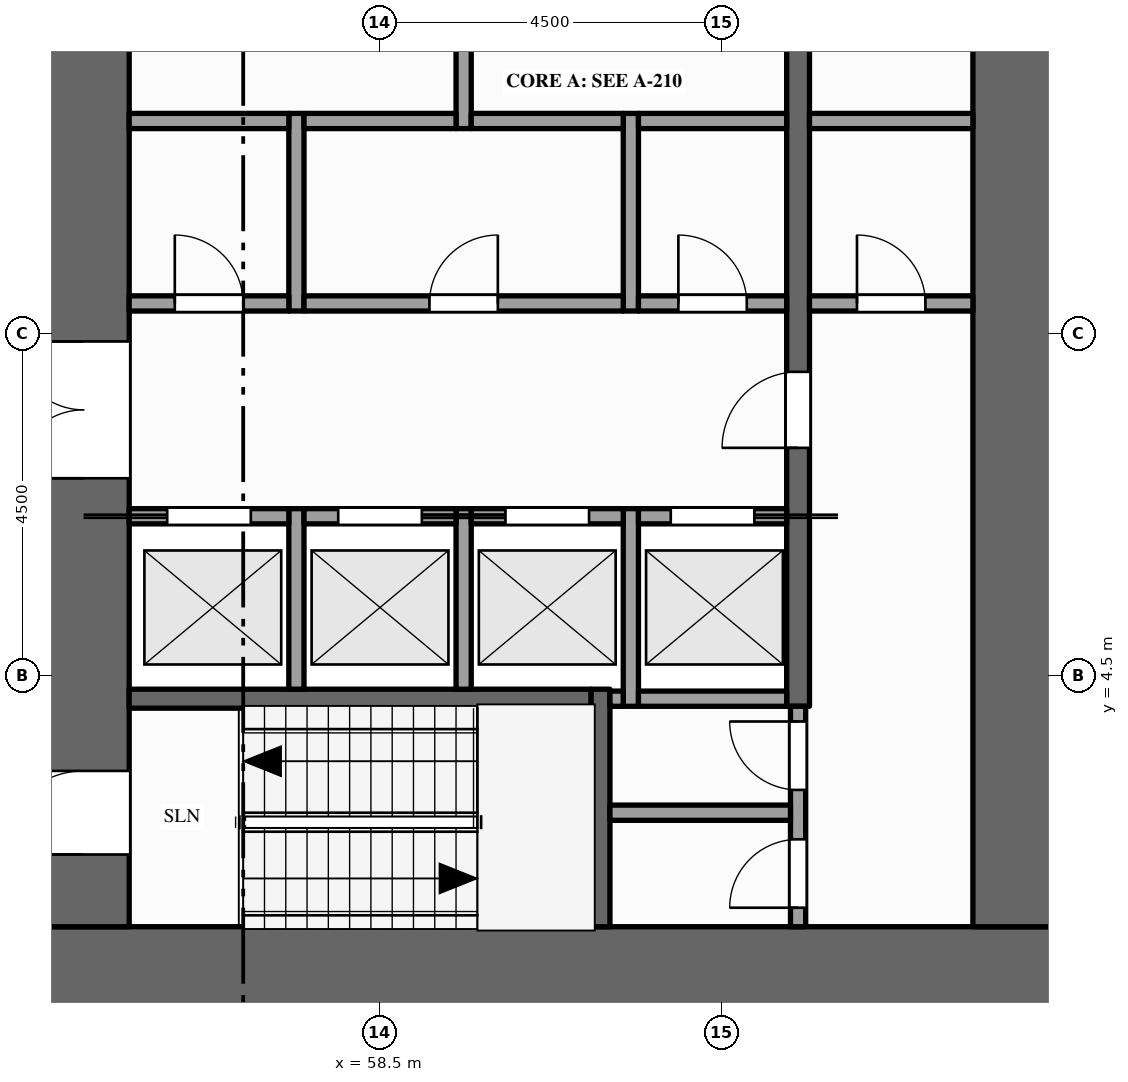
"""IFC4 building model, lengths in metres.
Left out: names, types, materials, properties, quantities, classifications, styles, units other than length and angle.
Written with IfcOpenShell. Run it as: python <this file> out.ifc"""

import sys

from ifc_helpers import new_model, si_unit, direction, frame, frame_2d, origin, place, context, subcontext, project, spatial, rectangle, extrude, element, fill, save


model = new_model("IFC4")
c1 = context("Model", 3, precision=1e-05, world=origin(), true_north=direction((0.0, 1.0)))
c2 = subcontext(c1, "Body", "Model", "MODEL_VIEW")
j1 = project(units=[si_unit("LENGTHUNIT", "METRE"), si_unit("PLANEANGLEUNIT", "RADIAN")], contexts=[c1])
p1 = place(None, origin())
s1 = spatial("IfcSite", under=j1, at=p1, CompositionType="ELEMENT")
p2 = place(p1, origin())
s2 = spatial("IfcBuilding", under=s1, at=p2, CompositionType="ELEMENT")
p3 = place(p2, frame((0.0, 0.0, 49.0)))
s3 = spatial("IfcBuildingStorey", under=s2, at=p3, CompositionType="ELEMENT", Elevation=49.0)
p4 = place(p3, frame((67.5, 0.6, -0.15), z_axis=(0.0, 0.0, 1.0), x_axis=(-1.0, 0.0, 0.0)))
e1 = element("IfcWall", 1, at=p4, inside=s3, PredefinedType="SHEAR", context=c2, shape_type="SweptSolid", body=[
    extrude(rectangle(XDim=13.5, YDim=1.2, at=frame_2d((6.75, 0.0))), origin(), (0.0, 0.0, 1.0), 4.0),
])
p5 = place(p3, frame((54.6, 1.2, -0.15), z_axis=(0.0, 0.0, 1.0), x_axis=(0.0, 1.0, 0.0)))
e2 = element("IfcWall", 2, at=p5, inside=s3, PredefinedType="SHEAR", context=c2, shape_type="SweptSolid", body=[
    extrude(rectangle(XDim=20.1, YDim=1.2, at=frame_2d((10.05, 0.0))), origin(), (0.0, 0.0, 1.0), 4.0),
])
p6 = place(p5, frame((5.9, 0.0, 0.15)))
e3 = element("IfcOpeningElement", 3, at=p6, cuts=e2, PredefinedType="OPENING", context=c2, shape_type="SweptSolid", body=[
    extrude(rectangle(XDim=1.8, YDim=2.1, at=frame_2d((0.9, 1.05))), frame((0.0, 0.61, 0.0), z_axis=(0.0, -1.0, 0.0), x_axis=(1.0, 0.0, 0.0)), (0.0, 0.0, 1.0), 1.22),
])
p7 = place(p5, frame((11.95, 0.0, 0.15)))
e4 = element("IfcOpeningElement", 4, at=p7, cuts=e2, PredefinedType="OPENING", context=c2, shape_type="SweptSolid", body=[
    extrude(rectangle(XDim=1.1, YDim=2.1, at=frame_2d((0.55, 1.05))), frame((0.0, 0.61, 0.0), z_axis=(0.0, -1.0, 0.0), x_axis=(1.0, 0.0, 0.0)), (0.0, 0.0, 1.0), 1.22),
])
p8 = place(p5, frame((0.95, 0.0, 0.15)))
e5 = element("IfcOpeningElement", 5, at=p8, cuts=e2, PredefinedType="OPENING", context=c2, shape_type="SweptSolid", body=[
    extrude(rectangle(XDim=1.1, YDim=2.1, at=frame_2d((0.55, 1.05))), frame((0.0, 0.61, 0.0), z_axis=(0.0, -1.0, 0.0), x_axis=(1.0, 0.0, 0.0)), (0.0, 0.0, 1.0), 1.22),
])
p9 = place(p5, frame((18.15, 0.0, 0.15)))
e6 = element("IfcOpeningElement", 6, at=p9, cuts=e2, PredefinedType="OPENING", context=c2, shape_type="SweptSolid", body=[
    extrude(rectangle(XDim=1.1, YDim=2.1, at=frame_2d((0.55, 1.05))), frame((0.0, 0.61, 0.0), z_axis=(0.0, -1.0, 0.0), x_axis=(1.0, 0.0, 0.0)), (0.0, 0.0, 1.0), 1.22),
])
p10 = place(p3, frame((66.9, 1.2, -0.15), z_axis=(0.0, 0.0, 1.0), x_axis=(0.0, 1.0, 0.0)))
e7 = element("IfcWall", 7, at=p10, inside=s3, PredefinedType="SHEAR", context=c2, shape_type="SweptSolid", body=[
    extrude(rectangle(XDim=20.1, YDim=1.2, at=frame_2d((10.05, 0.0))), origin(), (0.0, 0.0, 1.0), 4.0),
])
p11 = place(p3, frame((57.4, 4.325, 0.0), z_axis=(0.0, 0.0, 1.0), x_axis=(0.0, 1.0, 0.0)))
e8 = element("IfcWall", 8, at=p11, inside=s3, PredefinedType="SOLIDWALL", context=c2, shape_type="SweptSolid", body=[
    extrude(rectangle(XDim=2.375, YDim=0.2, at=frame_2d((1.188, 0.0))), origin(), (0.0, 0.0, 1.0), 3.85),
])
p12 = place(p3, frame((57.4, 9.3, 0.0), z_axis=(0.0, 0.0, 1.0), x_axis=(0.0, 1.0, 0.0)))
e9 = element("IfcWall", 9, at=p12, inside=s3, PredefinedType="PARTITIONING", context=c2, shape_type="SweptSolid", body=[
    extrude(rectangle(XDim=2.6, YDim=0.2, at=frame_2d((1.3, 0.0))), origin(), (0.0, 0.0, 1.0), 3.85),
])
p13 = place(p3, frame((59.6, 4.325, 0.0), z_axis=(0.0, 0.0, 1.0), x_axis=(0.0, 1.0, 0.0)))
e10 = element("IfcWall", 10, at=p13, inside=s3, PredefinedType="SOLIDWALL", context=c2, shape_type="SweptSolid", body=[
    extrude(rectangle(XDim=2.375, YDim=0.2, at=frame_2d((1.188, 0.0))), origin(), (0.0, 0.0, 1.0), 3.85),
])
p14 = place(p3, frame((59.6, 11.7, 0.0), z_axis=(0.0, 0.0, 1.0), x_axis=(0.0, 1.0, 0.0)))
e11 = element("IfcWall", 11, at=p14, inside=s3, PredefinedType="PARTITIONING", context=c2, shape_type="SweptSolid", body=[
    extrude(rectangle(XDim=3.8, YDim=0.2, at=frame_2d((1.9, 0.0))), origin(), (0.0, 0.0, 1.0), 3.85),
])
p15 = place(p14, frame((1.5, 0.0, 0.0)))
e12 = element("IfcOpeningElement", 12, at=p15, cuts=e11, PredefinedType="OPENING", context=c2, shape_type="SweptSolid", body=[
    extrude(rectangle(XDim=1.0, YDim=2.1, at=frame_2d((0.5, 1.05))), frame((0.0, 0.11, 0.0), z_axis=(0.0, -1.0, 0.0), x_axis=(1.0, 0.0, 0.0)), (0.0, 0.0, 1.0), 0.22),
])
p16 = place(p3, frame((61.4, 1.2, 0.0), z_axis=(0.0, 0.0, 1.0), x_axis=(0.0, 1.0, 0.0)))
e13 = element("IfcWall", 13, at=p16, inside=s3, PredefinedType="SHEAR", context=c2, shape_type="SweptSolid", body=[
    extrude(rectangle(XDim=3.125, YDim=0.25, at=frame_2d((1.562, 0.0))), origin(), (0.0, 0.0, 1.0), 3.85),
])
p17 = place(p3, frame((61.8, 4.1, 0.0), z_axis=(0.0, 0.0, 1.0), x_axis=(0.0, 1.0, 0.0)))
e14 = element("IfcWall", 14, at=p17, inside=s3, PredefinedType="SOLIDWALL", context=c2, shape_type="SweptSolid", body=[
    extrude(rectangle(XDim=2.6, YDim=0.2, at=frame_2d((1.3, 0.0))), origin(), (0.0, 0.0, 1.0), 3.85),
])
p18 = place(p3, frame((61.8, 9.3, 0.0), z_axis=(0.0, 0.0, 1.0), x_axis=(0.0, 1.0, 0.0)))
e15 = element("IfcWall", 15, at=p18, inside=s3, PredefinedType="PARTITIONING", context=c2, shape_type="SweptSolid", body=[
    extrude(rectangle(XDim=2.6, YDim=0.2, at=frame_2d((1.3, 0.0))), origin(), (0.0, 0.0, 1.0), 3.85),
])
p19 = place(p3, frame((64.0, 1.2, 0.0), z_axis=(0.0, 0.0, 1.0), x_axis=(0.0, 1.0, 0.0)))
e16 = element("IfcWall", 16, at=p19, inside=s3, PredefinedType="PARTITIONING", context=c2, shape_type="SweptSolid", body=[
    extrude(rectangle(XDim=2.9, YDim=0.2, at=frame_2d((1.45, 0.0))), origin(), (0.0, 0.0, 1.0), 3.85),
])
p20 = place(p19, frame((0.25, 0.0, 0.0)))
e17 = element("IfcOpeningElement", 17, at=p20, cuts=e16, PredefinedType="OPENING", context=c2, shape_type="SweptSolid", body=[
    extrude(rectangle(XDim=0.9, YDim=2.1, at=frame_2d((0.45, 1.05))), frame((0.0, 0.11, 0.0), z_axis=(0.0, -1.0, 0.0), x_axis=(1.0, 0.0, 0.0)), (0.0, 0.0, 1.0), 0.22),
])
p21 = place(p19, frame((1.8, 0.0, 0.0)))
e18 = element("IfcOpeningElement", 18, at=p21, cuts=e16, PredefinedType="OPENING", context=c2, shape_type="SweptSolid", body=[
    extrude(rectangle(XDim=0.9, YDim=2.1, at=frame_2d((0.45, 1.05))), frame((0.0, 0.11, 0.0), z_axis=(0.0, -1.0, 0.0), x_axis=(1.0, 0.0, 0.0)), (0.0, 0.0, 1.0), 0.22),
])
p22 = place(p3, frame((64.0, 4.1, 0.0), z_axis=(0.0, 0.0, 1.0), x_axis=(0.0, 1.0, 0.0)))
e19 = element("IfcWall", 19, at=p22, inside=s3, PredefinedType="SHEAR", context=c2, shape_type="SweptSolid", body=[
    extrude(rectangle(XDim=14.5, YDim=0.3, at=frame_2d((7.25, 0.0))), origin(), (0.0, 0.0, 1.0), 3.85),
])
p23 = place(p22, frame((3.4, 0.0, 0.0)))
e20 = element("IfcOpeningElement", 20, at=p23, cuts=e19, PredefinedType="OPENING", context=c2, shape_type="SweptSolid", body=[
    extrude(rectangle(XDim=1.0, YDim=2.1, at=frame_2d((0.5, 1.05))), frame((0.0, 0.16, 0.0), z_axis=(0.0, -1.0, 0.0), x_axis=(1.0, 0.0, 0.0)), (0.0, 0.0, 1.0), 0.32),
])
p24 = place(p22, frame((9.1, 0.0, 0.0)))
e21 = element("IfcOpeningElement", 21, at=p24, cuts=e19, PredefinedType="OPENING", context=c2, shape_type="SweptSolid", body=[
    extrude(rectangle(XDim=1.0, YDim=2.1, at=frame_2d((0.5, 1.05))), frame((0.0, 0.16, 0.0), z_axis=(0.0, -1.0, 0.0), x_axis=(1.0, 0.0, 0.0)), (0.0, 0.0, 1.0), 0.32),
])
p25 = place(p3, frame((61.525, 2.7, 0.0), z_axis=(0.0, 0.0, 1.0), x_axis=(1.0, 0.0, 0.0)))
e22 = element("IfcWall", 22, at=p25, inside=s3, PredefinedType="PARTITIONING", context=c2, shape_type="SweptSolid", body=[
    extrude(rectangle(XDim=2.375, YDim=0.2, at=frame_2d((1.188, 0.0))), origin(), (0.0, 0.0, 1.0), 3.85),
])
p26 = place(p3, frame((55.2, 4.2, 0.0), z_axis=(0.0, 0.0, 1.0), x_axis=(1.0, 0.0, 0.0)))
e23 = element("IfcWall", 23, at=p26, inside=s3, PredefinedType="SHEAR", context=c2, shape_type="SweptSolid", body=[
    extrude(rectangle(XDim=6.075, YDim=0.25, at=frame_2d((3.038, 0.0))), origin(), (0.0, 0.0, 1.0), 3.85),
])
p27 = place(p3, frame((61.525, 4.2, 0.0), z_axis=(0.0, 0.0, 1.0), x_axis=(1.0, 0.0, 0.0)))
e24 = element("IfcWall", 24, at=p27, inside=s3, PredefinedType="SOLIDWALL", context=c2, shape_type="SweptSolid", body=[
    extrude(rectangle(XDim=0.175, YDim=0.2, at=frame_2d((0.087, 0.0))), origin(), (0.0, 0.0, 1.0), 3.85),
])
p28 = place(p3, frame((61.9, 4.2, 0.0), z_axis=(0.0, 0.0, 1.0), x_axis=(1.0, 0.0, 0.0)))
e25 = element("IfcWall", 25, at=p28, inside=s3, PredefinedType="SOLIDWALL", context=c2, shape_type="SweptSolid", body=[
    extrude(rectangle(XDim=1.95, YDim=0.2, at=frame_2d((0.975, 0.0))), origin(), (0.0, 0.0, 1.0), 3.85),
])
p29 = place(p3, frame((55.2, 6.6, 0.0), z_axis=(0.0, 0.0, 1.0), x_axis=(1.0, 0.0, 0.0)))
e26 = element("IfcWall", 26, at=p29, inside=s3, PredefinedType="SOLIDWALL", context=c2, shape_type="SweptSolid", body=[
    extrude(rectangle(XDim=2.1, YDim=0.2, at=frame_2d((1.05, 0.0))), origin(), (0.0, 0.0, 1.0), 3.85),
])
p30 = place(p29, frame((0.5, 0.0, 0.012)))
e27 = element("IfcOpeningElement", 27, at=p30, cuts=e26, PredefinedType="OPENING", context=c2, shape_type="SweptSolid", body=[
    extrude(rectangle(XDim=1.1, YDim=2.1, at=frame_2d((0.55, 1.05))), frame((0.0, 0.11, 0.0), z_axis=(0.0, -1.0, 0.0), x_axis=(1.0, 0.0, 0.0)), (0.0, 0.0, 1.0), 0.22),
])
p31 = place(p3, frame((57.5, 6.6, 0.0), z_axis=(0.0, 0.0, 1.0), x_axis=(1.0, 0.0, 0.0)))
e28 = element("IfcWall", 28, at=p31, inside=s3, PredefinedType="SOLIDWALL", context=c2, shape_type="SweptSolid", body=[
    extrude(rectangle(XDim=2.0, YDim=0.2, at=frame_2d((1.0, 0.0))), origin(), (0.0, 0.0, 1.0), 3.85),
])
p32 = place(p31, frame((0.45, 0.0, 0.012)))
e29 = element("IfcOpeningElement", 29, at=p32, cuts=e28, PredefinedType="OPENING", context=c2, shape_type="SweptSolid", body=[
    extrude(rectangle(XDim=1.1, YDim=2.1, at=frame_2d((0.55, 1.05))), frame((0.0, 0.11, 0.0), z_axis=(0.0, -1.0, 0.0), x_axis=(1.0, 0.0, 0.0)), (0.0, 0.0, 1.0), 0.22),
])
p33 = place(p3, frame((59.7, 6.6, 0.0), z_axis=(0.0, 0.0, 1.0), x_axis=(1.0, 0.0, 0.0)))
e30 = element("IfcWall", 30, at=p33, inside=s3, PredefinedType="SOLIDWALL", context=c2, shape_type="SweptSolid", body=[
    extrude(rectangle(XDim=2.0, YDim=0.2, at=frame_2d((1.0, 0.0))), origin(), (0.0, 0.0, 1.0), 3.85),
])
p34 = place(p33, frame((0.45, 0.0, 0.012)))
e31 = element("IfcOpeningElement", 31, at=p34, cuts=e30, PredefinedType="OPENING", context=c2, shape_type="SweptSolid", body=[
    extrude(rectangle(XDim=1.1, YDim=2.1, at=frame_2d((0.55, 1.05))), frame((0.0, 0.11, 0.0), z_axis=(0.0, -1.0, 0.0), x_axis=(1.0, 0.0, 0.0)), (0.0, 0.0, 1.0), 0.22),
])
p35 = place(p3, frame((61.9, 6.6, 0.0), z_axis=(0.0, 0.0, 1.0), x_axis=(1.0, 0.0, 0.0)))
e32 = element("IfcWall", 32, at=p35, inside=s3, PredefinedType="SOLIDWALL", context=c2, shape_type="SweptSolid", body=[
    extrude(rectangle(XDim=1.95, YDim=0.2, at=frame_2d((0.975, 0.0))), origin(), (0.0, 0.0, 1.0), 3.85),
])
p36 = place(p35, frame((0.425, 0.0, 0.012)))
e33 = element("IfcOpeningElement", 33, at=p36, cuts=e32, PredefinedType="OPENING", context=c2, shape_type="SweptSolid", body=[
    extrude(rectangle(XDim=1.1, YDim=2.1, at=frame_2d((0.55, 1.05))), frame((0.0, 0.11, 0.0), z_axis=(0.0, -1.0, 0.0), x_axis=(1.0, 0.0, 0.0)), (0.0, 0.0, 1.0), 0.22),
])
p37 = place(p3, frame((55.2, 9.4, 0.0), z_axis=(0.0, 0.0, 1.0), x_axis=(1.0, 0.0, 0.0)))
e34 = element("IfcWall", 34, at=p37, inside=s3, PredefinedType="PARTITIONING", context=c2, shape_type="SweptSolid", body=[
    extrude(rectangle(XDim=2.1, YDim=0.2, at=frame_2d((1.05, 0.0))), origin(), (0.0, 0.0, 1.0), 3.85),
])
p38 = place(p37, frame((0.6, 0.0, 0.0)))
e35 = element("IfcOpeningElement", 35, at=p38, cuts=e34, PredefinedType="OPENING", context=c2, shape_type="SweptSolid", body=[
    extrude(rectangle(XDim=0.9, YDim=2.1, at=frame_2d((0.45, 1.05))), frame((0.0, 0.11, 0.0), z_axis=(0.0, -1.0, 0.0), x_axis=(1.0, 0.0, 0.0)), (0.0, 0.0, 1.0), 0.22),
])
p39 = place(p3, frame((57.5, 9.4, 0.0), z_axis=(0.0, 0.0, 1.0), x_axis=(1.0, 0.0, 0.0)))
e36 = element("IfcWall", 36, at=p39, inside=s3, PredefinedType="PARTITIONING", context=c2, shape_type="SweptSolid", body=[
    extrude(rectangle(XDim=4.2, YDim=0.2, at=frame_2d((2.1, 0.0))), origin(), (0.0, 0.0, 1.0), 3.85),
])
p40 = place(p39, frame((1.65, 0.0, 0.0)))
e37 = element("IfcOpeningElement", 37, at=p40, cuts=e36, PredefinedType="OPENING", context=c2, shape_type="SweptSolid", body=[
    extrude(rectangle(XDim=0.9, YDim=2.1, at=frame_2d((0.45, 1.05))), frame((0.0, 0.11, 0.0), z_axis=(0.0, -1.0, 0.0), x_axis=(1.0, 0.0, 0.0)), (0.0, 0.0, 1.0), 0.22),
])
p41 = place(p3, frame((61.9, 9.4, 0.0), z_axis=(0.0, 0.0, 1.0), x_axis=(1.0, 0.0, 0.0)))
e38 = element("IfcWall", 38, at=p41, inside=s3, PredefinedType="PARTITIONING", context=c2, shape_type="SweptSolid", body=[
    extrude(rectangle(XDim=1.95, YDim=0.2, at=frame_2d((0.975, 0.0))), origin(), (0.0, 0.0, 1.0), 3.85),
])
p42 = place(p41, frame((0.525, 0.0, 0.0)))
e39 = element("IfcOpeningElement", 39, at=p42, cuts=e38, PredefinedType="OPENING", context=c2, shape_type="SweptSolid", body=[
    extrude(rectangle(XDim=0.9, YDim=2.1, at=frame_2d((0.45, 1.05))), frame((0.0, 0.11, 0.0), z_axis=(0.0, -1.0, 0.0), x_axis=(1.0, 0.0, 0.0)), (0.0, 0.0, 1.0), 0.22),
])
p43 = place(p3, frame((64.15, 9.4, 0.0), z_axis=(0.0, 0.0, 1.0), x_axis=(1.0, 0.0, 0.0)))
e40 = element("IfcWall", 40, at=p43, inside=s3, PredefinedType="PARTITIONING", context=c2, shape_type="SweptSolid", body=[
    extrude(rectangle(XDim=2.15, YDim=0.2, at=frame_2d((1.075, 0.0))), origin(), (0.0, 0.0, 1.0), 3.85),
])
p44 = place(p43, frame((0.625, 0.0, 0.0)))
e41 = element("IfcOpeningElement", 41, at=p44, cuts=e40, PredefinedType="OPENING", context=c2, shape_type="SweptSolid", body=[
    extrude(rectangle(XDim=0.9, YDim=2.1, at=frame_2d((0.45, 1.05))), frame((0.0, 0.11, 0.0), z_axis=(0.0, -1.0, 0.0), x_axis=(1.0, 0.0, 0.0)), (0.0, 0.0, 1.0), 0.22),
])
p45 = place(p3, frame((55.2, 11.8, 0.0), z_axis=(0.0, 0.0, 1.0), x_axis=(1.0, 0.0, 0.0)))
e42 = element("IfcWall", 42, at=p45, inside=s3, PredefinedType="PARTITIONING", context=c2, shape_type="SweptSolid", body=[
    extrude(rectangle(XDim=2.1, YDim=0.2, at=frame_2d((1.05, 0.0))), origin(), (0.0, 0.0, 1.0), 3.85),
])
for number, where, z_axis, x_axis in (
    (43, (57.5, 11.8, 0.0), (0.0, 0.0, 1.0), (1.0, 0.0, 0.0)),
    (44, (59.7, 11.8, 0.0), (0.0, 0.0, 1.0), (1.0, 0.0, 0.0)),
):
    element("IfcWall", number, at=place(p3, frame(where, z_axis=z_axis, x_axis=x_axis)), inside=s3, PredefinedType="PARTITIONING", context=c2, shape_type="SweptSolid", body=[
        extrude(rectangle(XDim=2.0, YDim=0.2, at=frame_2d((1.0, 0.0))), origin(), (0.0, 0.0, 1.0), 3.85),
    ])
p46 = place(p3, frame((61.9, 11.8, 0.0), z_axis=(0.0, 0.0, 1.0), x_axis=(1.0, 0.0, 0.0)))
e45 = element("IfcWall", 45, at=p46, inside=s3, PredefinedType="PARTITIONING", context=c2, shape_type="SweptSolid", body=[
    extrude(rectangle(XDim=1.95, YDim=0.2, at=frame_2d((0.975, 0.0))), origin(), (0.0, 0.0, 1.0), 3.85),
])
p47 = place(p3, frame((64.15, 11.8, 0.0), z_axis=(0.0, 0.0, 1.0), x_axis=(1.0, 0.0, 0.0)))
e46 = element("IfcWall", 46, at=p47, inside=s3, PredefinedType="PARTITIONING", context=c2, shape_type="SweptSolid", body=[
    extrude(rectangle(XDim=2.15, YDim=0.2, at=frame_2d((1.075, 0.0))), origin(), (0.0, 0.0, 1.0), 3.85),
])
p48 = place(p30, origin())
e47 = element("IfcDoor", 47, at=p48, inside=s3, OperationType="SLIDING_TO_LEFT", PredefinedType="DOOR", context=c2, shape_type="SweptSolid", body=[
    extrude(rectangle(XDim=1.1, YDim=2.1, at=frame_2d((0.55, 1.05))), frame((0.0, 0.025, 0.0), z_axis=(0.0, -1.0, 0.0), x_axis=(1.0, 0.0, 0.0)), (0.0, 0.0, 1.0), 0.05),
])
fill(e27, e47)
p49 = place(p32, origin())
e48 = element("IfcDoor", 48, at=p49, inside=s3, OperationType="SLIDING_TO_RIGHT", PredefinedType="DOOR", context=c2, shape_type="SweptSolid", body=[
    extrude(rectangle(XDim=1.1, YDim=2.1, at=frame_2d((0.55, 1.05))), frame((0.0, 0.025, 0.0), z_axis=(0.0, -1.0, 0.0), x_axis=(1.0, 0.0, 0.0)), (0.0, 0.0, 1.0), 0.05),
])
fill(e29, e48)
p50 = place(p34, origin())
e49 = element("IfcDoor", 49, at=p50, inside=s3, OperationType="SLIDING_TO_LEFT", PredefinedType="DOOR", context=c2, shape_type="SweptSolid", body=[
    extrude(rectangle(XDim=1.1, YDim=2.1, at=frame_2d((0.55, 1.05))), frame((0.0, 0.025, 0.0), z_axis=(0.0, -1.0, 0.0), x_axis=(1.0, 0.0, 0.0)), (0.0, 0.0, 1.0), 0.05),
])
fill(e31, e49)
p51 = place(p36, origin())
e50 = element("IfcDoor", 50, at=p51, inside=s3, OperationType="SLIDING_TO_RIGHT", PredefinedType="DOOR", context=c2, shape_type="SweptSolid", body=[
    extrude(rectangle(XDim=1.1, YDim=2.1, at=frame_2d((0.55, 1.05))), frame((0.0, 0.025, 0.0), z_axis=(0.0, -1.0, 0.0), x_axis=(1.0, 0.0, 0.0)), (0.0, 0.0, 1.0), 0.05),
])
fill(e33, e50)
p52 = place(p6, origin())
e51 = element("IfcDoor", 51, at=p52, inside=s3, OperationType="DOUBLE_DOOR_SINGLE_SWING", PredefinedType="DOOR", context=c2, shape_type="SweptSolid", body=[
    extrude(rectangle(XDim=1.8, YDim=2.1, at=frame_2d((0.9, 1.05))), frame((0.0, 0.025, 0.0), z_axis=(0.0, -1.0, 0.0), x_axis=(1.0, 0.0, 0.0)), (0.0, 0.0, 1.0), 0.05),
])
fill(e3, e51)
p53 = place(p23, origin())
e52 = element("IfcDoor", 52, at=p53, inside=s3, OperationType="SINGLE_SWING_LEFT", PredefinedType="DOOR", context=c2, shape_type="SweptSolid", body=[
    extrude(rectangle(XDim=1.0, YDim=2.1, at=frame_2d((0.5, 1.05))), frame((0.0, 0.025, 0.0), z_axis=(0.0, -1.0, 0.0), x_axis=(1.0, 0.0, 0.0)), (0.0, 0.0, 1.0), 0.05),
])
fill(e20, e52)
p54 = place(p44, origin())
e53 = element("IfcDoor", 53, at=p54, inside=s3, OperationType="SINGLE_SWING_LEFT", PredefinedType="DOOR", context=c2, shape_type="SweptSolid", body=[
    extrude(rectangle(XDim=0.9, YDim=2.1, at=frame_2d((0.45, 1.05))), frame((0.0, 0.025, 0.0), z_axis=(0.0, -1.0, 0.0), x_axis=(1.0, 0.0, 0.0)), (0.0, 0.0, 1.0), 0.05),
])
fill(e41, e53)
p55 = place(p8, origin())
e54 = element("IfcDoor", 54, at=p55, inside=s3, OperationType="SINGLE_SWING_LEFT", PredefinedType="DOOR", context=c2, shape_type="SweptSolid", body=[
    extrude(rectangle(XDim=1.1, YDim=2.1, at=frame_2d((0.55, 1.05))), frame((0.0, 0.025, 0.0), z_axis=(0.0, -1.0, 0.0), x_axis=(1.0, 0.0, 0.0)), (0.0, 0.0, 1.0), 0.05),
])
fill(e5, e54)
p56 = place(p20, origin())
e55 = element("IfcDoor", 55, at=p56, inside=s3, OperationType="SINGLE_SWING_LEFT", PredefinedType="DOOR", context=c2, shape_type="SweptSolid", body=[
    extrude(rectangle(XDim=0.9, YDim=2.1, at=frame_2d((0.45, 1.05))), frame((0.0, 0.025, 0.0), z_axis=(0.0, -1.0, 0.0), x_axis=(1.0, 0.0, 0.0)), (0.0, 0.0, 1.0), 0.05),
])
fill(e17, e55)
p57 = place(p21, origin())
e56 = element("IfcDoor", 56, at=p57, inside=s3, OperationType="SINGLE_SWING_RIGHT", PredefinedType="DOOR", context=c2, shape_type="SweptSolid", body=[
    extrude(rectangle(XDim=0.9, YDim=2.1, at=frame_2d((0.45, 1.05))), frame((0.0, 0.025, 0.0), z_axis=(0.0, -1.0, 0.0), x_axis=(1.0, 0.0, 0.0)), (0.0, 0.0, 1.0), 0.05),
])
fill(e18, e56)
p58 = place(p38, origin())
e57 = element("IfcDoor", 57, at=p58, inside=s3, OperationType="SINGLE_SWING_LEFT", PredefinedType="DOOR", context=c2, shape_type="SweptSolid", body=[
    extrude(rectangle(XDim=0.9, YDim=2.1, at=frame_2d((0.45, 1.05))), frame((0.0, 0.025, 0.0), z_axis=(0.0, -1.0, 0.0), x_axis=(1.0, 0.0, 0.0)), (0.0, 0.0, 1.0), 0.05),
])
fill(e35, e57)
p59 = place(p40, origin())
e58 = element("IfcDoor", 58, at=p59, inside=s3, OperationType="SINGLE_SWING_RIGHT", PredefinedType="DOOR", context=c2, shape_type="SweptSolid", body=[
    extrude(rectangle(XDim=0.9, YDim=2.1, at=frame_2d((0.45, 1.05))), frame((0.0, 0.025, 0.0), z_axis=(0.0, -1.0, 0.0), x_axis=(1.0, 0.0, 0.0)), (0.0, 0.0, 1.0), 0.05),
])
fill(e37, e58)
p60 = place(p42, origin())
e59 = element("IfcDoor", 59, at=p60, inside=s3, OperationType="SINGLE_SWING_LEFT", PredefinedType="DOOR", context=c2, shape_type="SweptSolid", body=[
    extrude(rectangle(XDim=0.9, YDim=2.1, at=frame_2d((0.45, 1.05))), frame((0.0, 0.025, 0.0), z_axis=(0.0, -1.0, 0.0), x_axis=(1.0, 0.0, 0.0)), (0.0, 0.0, 1.0), 0.05),
])
fill(e39, e59)
save(model, sys.argv[1])
